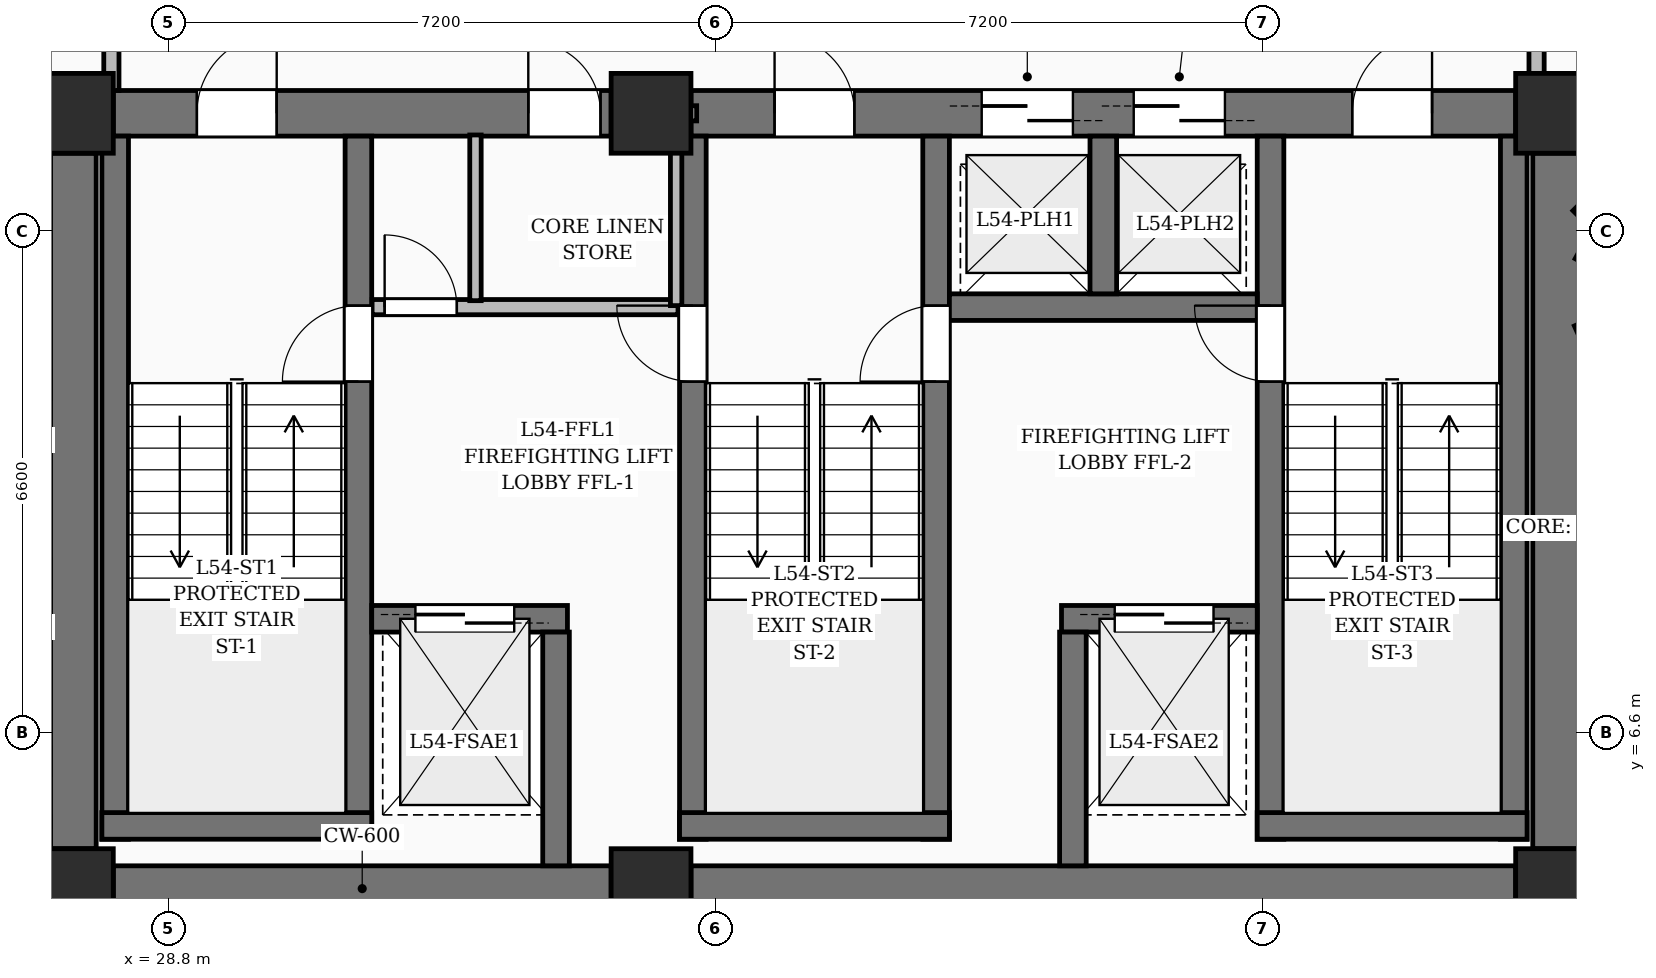
"""IFC4 building model, lengths in metres.
Left out: names, types, materials, properties, quantities, classifications, styles, units other than length and angle.
Written with IfcOpenShell. Run it as: python <this file> out.ifc"""

import sys

from ifc_helpers import new_model, si_unit, direction, frame, frame_2d, origin, origin_2d, place, context, subcontext, project, spatial, rectangle, extrude, element, fill, save


model = new_model("IFC4")
c1 = context("Model", 3, precision=1e-05, world=origin(), true_north=direction((0.0, 1.0)))
c2 = subcontext(c1, "Body", "Model", "MODEL_VIEW")
j1 = project(units=[si_unit("LENGTHUNIT", "METRE"), si_unit("PLANEANGLEUNIT", "RADIAN")], contexts=[c1])
p1 = place(None, origin())
s1 = spatial("IfcSite", under=j1, at=p1, CompositionType="ELEMENT")
p2 = place(p1, origin())
s2 = spatial("IfcBuilding", under=s1, at=p2, CompositionType="ELEMENT")
p3 = place(p2, frame((0.0, 0.0, 210.75)))
s3 = spatial("IfcBuildingStorey", under=s2, at=p3, CompositionType="ELEMENT", Elevation=210.75)
for number, where, z_axis, x_axis in (
    (1, (27.55, 4.55, 0.0), (0.0, 0.0, 1.0), (1.0, 0.0, 0.0)),
    (2, (35.15, 4.55, 0.0), (0.0, 0.0, 1.0), (1.0, 0.0, 0.0)),
    (3, (47.05, 4.55, 0.0), (0.0, 0.0, 1.0), (1.0, 0.0, 0.0)),
    (4, (27.55, 14.75, 0.0), (0.0, 0.0, 1.0), (1.0, 0.0, 0.0)),
    (5, (35.15, 14.75, 0.0), (0.0, 0.0, 1.0), (1.0, 0.0, 0.0)),
    (6, (47.05, 14.75, 0.0), (0.0, 0.0, 1.0), (1.0, 0.0, 0.0)),
):
    element("IfcColumn", number, at=place(p3, frame(where, z_axis=z_axis, x_axis=x_axis)), inside=s3, PredefinedType="COLUMN", context=c2, shape_type="SweptSolid", body=[
        extrude(rectangle(XDim=1.05, YDim=1.05, at=origin_2d()), origin(), (0.0, 0.0, 1.0), 3.75),
    ])
p4 = place(p3, frame((28.075, 4.55, 0.0), z_axis=(0.0, 0.0, 1.0), x_axis=(1.0, 0.0, 0.0)))
e7 = element("IfcWall", 7, at=p4, inside=s3, PredefinedType="SHEAR", context=c2, shape_type="SweptSolid", body=[
    extrude(rectangle(XDim=6.55, YDim=0.6, at=frame_2d((3.275, 0.0))), origin(), (0.0, 0.0, 1.0), 3.75),
])
p5 = place(p3, frame((35.675, 4.55, 0.0), z_axis=(0.0, 0.0, 1.0), x_axis=(1.0, 0.0, 0.0)))
e8 = element("IfcWall", 8, at=p5, inside=s3, PredefinedType="SHEAR", context=c2, shape_type="SweptSolid", body=[
    extrude(rectangle(XDim=10.85, YDim=0.6, at=frame_2d((5.425, 0.0))), origin(), (0.0, 0.0, 1.0), 3.75),
])
p6 = place(p3, frame((28.075, 14.75, 0.0), z_axis=(0.0, 0.0, 1.0), x_axis=(1.0, 0.0, 0.0)))
e9 = element("IfcWall", 9, at=p6, inside=s3, PredefinedType="SHEAR", context=c2, shape_type="SweptSolid", body=[
    extrude(rectangle(XDim=6.55, YDim=0.6, at=frame_2d((3.275, 0.0))), origin(), (0.0, 0.0, 1.0), 3.75),
])
p7 = place(p6, frame((1.1, 0.0, 0.0)))
e10 = element("IfcOpeningElement", 10, at=p7, cuts=e9, PredefinedType="OPENING", context=c2, shape_type="SweptSolid", body=[
    extrude(rectangle(XDim=1.05, YDim=2.15, at=frame_2d((0.525, 1.075))), frame((0.0, 0.31, 0.0), z_axis=(0.0, -1.0, 0.0), x_axis=(1.0, 0.0, 0.0)), (0.0, 0.0, 1.0), 0.62),
])
p8 = place(p6, frame((5.46, 0.0, 0.0)))
e11 = element("IfcOpeningElement", 11, at=p8, cuts=e9, PredefinedType="OPENING", context=c2, shape_type="SweptSolid", body=[
    extrude(rectangle(XDim=0.95, YDim=2.15, at=frame_2d((0.475, 1.075))), frame((0.0, 0.31, 0.0), z_axis=(0.0, -1.0, 0.0), x_axis=(1.0, 0.0, 0.0)), (0.0, 0.0, 1.0), 0.62),
])
p9 = place(p3, frame((35.675, 14.75, 0.0), z_axis=(0.0, 0.0, 1.0), x_axis=(1.0, 0.0, 0.0)))
e12 = element("IfcWall", 12, at=p9, inside=s3, PredefinedType="SHEAR", context=c2, shape_type="SweptSolid", body=[
    extrude(rectangle(XDim=10.85, YDim=0.6, at=frame_2d((5.425, 0.0))), origin(), (0.0, 0.0, 1.0), 3.75),
])
p10 = place(p9, frame((1.1, 0.0, 0.0)))
e13 = element("IfcOpeningElement", 13, at=p10, cuts=e12, PredefinedType="OPENING", context=c2, shape_type="SweptSolid", body=[
    extrude(rectangle(XDim=1.05, YDim=2.15, at=frame_2d((0.525, 1.075))), frame((0.0, 0.31, 0.0), z_axis=(0.0, -1.0, 0.0), x_axis=(1.0, 0.0, 0.0)), (0.0, 0.0, 1.0), 0.62),
])
p11 = place(p9, frame((8.7, 0.0, 0.0)))
e14 = element("IfcOpeningElement", 14, at=p11, cuts=e12, PredefinedType="OPENING", context=c2, shape_type="SweptSolid", body=[
    extrude(rectangle(XDim=1.05, YDim=2.15, at=frame_2d((0.525, 1.075))), frame((0.0, 0.31, 0.0), z_axis=(0.0, -1.0, 0.0), x_axis=(1.0, 0.0, 0.0)), (0.0, 0.0, 1.0), 0.62),
])
p12 = place(p9, frame((3.825, 0.0, 0.0)))
e15 = element("IfcOpeningElement", 15, at=p12, cuts=e12, PredefinedType="OPENING", context=c2, shape_type="SweptSolid", body=[
    extrude(rectangle(XDim=1.2, YDim=2.2, at=frame_2d((0.6, 1.1))), frame((0.0, 0.31, 0.0), z_axis=(0.0, -1.0, 0.0), x_axis=(1.0, 0.0, 0.0)), (0.0, 0.0, 1.0), 0.62),
])
p13 = place(p9, frame((5.825, 0.0, 0.0)))
e16 = element("IfcOpeningElement", 16, at=p13, cuts=e12, PredefinedType="OPENING", context=c2, shape_type="SweptSolid", body=[
    extrude(rectangle(XDim=1.2, YDim=2.2, at=frame_2d((0.6, 1.1))), frame((0.0, 0.31, 0.0), z_axis=(0.0, -1.0, 0.0), x_axis=(1.0, 0.0, 0.0)), (0.0, 0.0, 1.0), 0.62),
])
for number, where, z_axis, x_axis in (
    (17, (27.55, 5.075, 0.0), (0.0, 0.0, 1.0), (0.0, 1.0, 0.0)),
    (18, (47.05, 5.075, 0.0), (0.0, 0.0, 1.0), (0.0, 1.0, 0.0)),
):
    element("IfcWall", number, at=place(p3, frame(where, z_axis=z_axis, x_axis=x_axis)), inside=s3, PredefinedType="SHEAR", context=c2, shape_type="SweptSolid", body=[
        extrude(rectangle(XDim=9.15, YDim=0.6, at=frame_2d((4.575, 0.0))), origin(), (0.0, 0.0, 1.0), 3.75),
    ])
p14 = place(p3, frame((28.1, 5.2, 0.0), z_axis=(0.0, 0.0, 1.0), x_axis=(0.0, 1.0, 0.0)))
e19 = element("IfcWall", 19, at=p14, inside=s3, PredefinedType="SOLIDWALL", context=c2, shape_type="SweptSolid", body=[
    extrude(rectangle(XDim=9.25, YDim=0.35, at=frame_2d((4.625, 0.0))), origin(), (0.0, 0.0, 1.0), 3.75),
])
p15 = place(p3, frame((31.3, 5.2, 0.0), z_axis=(0.0, 0.0, 1.0), x_axis=(0.0, 1.0, 0.0)))
e20 = element("IfcWall", 20, at=p15, inside=s3, PredefinedType="SOLIDWALL", context=c2, shape_type="SweptSolid", body=[
    extrude(rectangle(XDim=9.25, YDim=0.35, at=frame_2d((4.625, 0.0))), origin(), (0.0, 0.0, 1.0), 3.75),
])
p16 = place(p15, frame((6.02, 0.0, 0.0)))
e21 = element("IfcOpeningElement", 21, at=p16, cuts=e20, PredefinedType="OPENING", context=c2, shape_type="SweptSolid", body=[
    extrude(rectangle(XDim=1.0, YDim=2.15, at=frame_2d((0.5, 1.075))), frame((0.0, 0.185, 0.0), z_axis=(0.0, -1.0, 0.0), x_axis=(1.0, 0.0, 0.0)), (0.0, 0.0, 1.0), 0.37),
])
p17 = place(p3, frame((27.925, 5.375, 0.0), z_axis=(0.0, 0.0, 1.0), x_axis=(1.0, 0.0, 0.0)))
e22 = element("IfcWall", 22, at=p17, inside=s3, PredefinedType="SOLIDWALL", context=c2, shape_type="SweptSolid", body=[
    extrude(rectangle(XDim=3.55, YDim=0.35, at=frame_2d((1.775, 0.0))), origin(), (0.0, 0.0, 1.0), 3.75),
])
p18 = place(p3, frame((35.7, 5.2, 0.0), z_axis=(0.0, 0.0, 1.0), x_axis=(0.0, 1.0, 0.0)))
e23 = element("IfcWall", 23, at=p18, inside=s3, PredefinedType="SOLIDWALL", context=c2, shape_type="SweptSolid", body=[
    extrude(rectangle(XDim=9.25, YDim=0.35, at=frame_2d((4.625, 0.0))), origin(), (0.0, 0.0, 1.0), 3.75),
])
p19 = place(p18, frame((6.02, 0.0, 0.0)))
e24 = element("IfcOpeningElement", 24, at=p19, cuts=e23, PredefinedType="OPENING", context=c2, shape_type="SweptSolid", body=[
    extrude(rectangle(XDim=1.0, YDim=2.15, at=frame_2d((0.5, 1.075))), frame((0.0, 0.185, 0.0), z_axis=(0.0, -1.0, 0.0), x_axis=(1.0, 0.0, 0.0)), (0.0, 0.0, 1.0), 0.37),
])
p20 = place(p3, frame((38.9, 5.2, 0.0), z_axis=(0.0, 0.0, 1.0), x_axis=(0.0, 1.0, 0.0)))
e25 = element("IfcWall", 25, at=p20, inside=s3, PredefinedType="SOLIDWALL", context=c2, shape_type="SweptSolid", body=[
    extrude(rectangle(XDim=9.25, YDim=0.35, at=frame_2d((4.625, 0.0))), origin(), (0.0, 0.0, 1.0), 3.75),
])
p21 = place(p20, frame((6.02, 0.0, 0.0)))
e26 = element("IfcOpeningElement", 26, at=p21, cuts=e25, PredefinedType="OPENING", context=c2, shape_type="SweptSolid", body=[
    extrude(rectangle(XDim=1.0, YDim=2.15, at=frame_2d((0.5, 1.075))), frame((0.0, 0.185, 0.0), z_axis=(0.0, -1.0, 0.0), x_axis=(1.0, 0.0, 0.0)), (0.0, 0.0, 1.0), 0.37),
])
p22 = place(p3, frame((35.525, 5.375, 0.0), z_axis=(0.0, 0.0, 1.0), x_axis=(1.0, 0.0, 0.0)))
e27 = element("IfcWall", 27, at=p22, inside=s3, PredefinedType="SOLIDWALL", context=c2, shape_type="SweptSolid", body=[
    extrude(rectangle(XDim=3.55, YDim=0.35, at=frame_2d((1.775, 0.0))), origin(), (0.0, 0.0, 1.0), 3.75),
])
p23 = place(p3, frame((43.3, 5.2, 0.0), z_axis=(0.0, 0.0, 1.0), x_axis=(0.0, 1.0, 0.0)))
e28 = element("IfcWall", 28, at=p23, inside=s3, PredefinedType="SOLIDWALL", context=c2, shape_type="SweptSolid", body=[
    extrude(rectangle(XDim=9.25, YDim=0.35, at=frame_2d((4.625, 0.0))), origin(), (0.0, 0.0, 1.0), 3.75),
])
p24 = place(p23, frame((6.02, 0.0, 0.0)))
e29 = element("IfcOpeningElement", 29, at=p24, cuts=e28, PredefinedType="OPENING", context=c2, shape_type="SweptSolid", body=[
    extrude(rectangle(XDim=1.0, YDim=2.15, at=frame_2d((0.5, 1.075))), frame((0.0, 0.185, 0.0), z_axis=(0.0, -1.0, 0.0), x_axis=(1.0, 0.0, 0.0)), (0.0, 0.0, 1.0), 0.37),
])
p25 = place(p3, frame((46.5, 5.2, 0.0), z_axis=(0.0, 0.0, 1.0), x_axis=(0.0, 1.0, 0.0)))
e30 = element("IfcWall", 30, at=p25, inside=s3, PredefinedType="SOLIDWALL", context=c2, shape_type="SweptSolid", body=[
    extrude(rectangle(XDim=9.25, YDim=0.35, at=frame_2d((4.625, 0.0))), origin(), (0.0, 0.0, 1.0), 3.75),
])
p26 = place(p3, frame((43.125, 5.375, 0.0), z_axis=(0.0, 0.0, 1.0), x_axis=(1.0, 0.0, 0.0)))
e31 = element("IfcWall", 31, at=p26, inside=s3, PredefinedType="SOLIDWALL", context=c2, shape_type="SweptSolid", body=[
    extrude(rectangle(XDim=3.55, YDim=0.35, at=frame_2d((1.775, 0.0))), origin(), (0.0, 0.0, 1.0), 3.75),
])
p27 = place(p3, frame((31.475, 8.1, 0.0), z_axis=(0.0, 0.0, 1.0), x_axis=(1.0, 0.0, 0.0)))
e32 = element("IfcWall", 32, at=p27, inside=s3, PredefinedType="SOLIDWALL", context=c2, shape_type="SweptSolid", body=[
    extrude(rectangle(XDim=2.575, YDim=0.35, at=frame_2d((1.288, 0.0))), origin(), (0.0, 0.0, 1.0), 3.75),
])
p28 = place(p27, frame((0.575, 0.0, 0.0)))
e33 = element("IfcOpeningElement", 33, at=p28, cuts=e32, PredefinedType="OPENING", context=c2, shape_type="SweptSolid", body=[
    extrude(rectangle(XDim=1.3, YDim=2.25, at=frame_2d((0.65, 1.125))), frame((0.0, 0.185, 0.0), z_axis=(0.0, -1.0, 0.0), x_axis=(1.0, 0.0, 0.0)), (0.0, 0.0, 1.0), 0.37),
])
p29 = place(p3, frame((40.55, 8.1, 0.0), z_axis=(0.0, 0.0, 1.0), x_axis=(1.0, 0.0, 0.0)))
e34 = element("IfcWall", 34, at=p29, inside=s3, PredefinedType="SOLIDWALL", context=c2, shape_type="SweptSolid", body=[
    extrude(rectangle(XDim=2.575, YDim=0.35, at=frame_2d((1.288, 0.0))), origin(), (0.0, 0.0, 1.0), 3.75),
])
p30 = place(p29, frame((0.7, 0.0, 0.0)))
e35 = element("IfcOpeningElement", 35, at=p30, cuts=e34, PredefinedType="OPENING", context=c2, shape_type="SweptSolid", body=[
    extrude(rectangle(XDim=1.3, YDim=2.25, at=frame_2d((0.65, 1.125))), frame((0.0, 0.185, 0.0), z_axis=(0.0, -1.0, 0.0), x_axis=(1.0, 0.0, 0.0)), (0.0, 0.0, 1.0), 0.37),
])
for number, where, z_axis, x_axis in (
    (36, (33.9, 4.85, 0.0), (0.0, 0.0, 1.0), (0.0, 1.0, 0.0)),
    (37, (40.7, 4.85, 0.0), (0.0, 0.0, 1.0), (0.0, 1.0, 0.0)),
):
    element("IfcWall", number, at=place(p3, frame(where, z_axis=z_axis, x_axis=x_axis)), inside=s3, PredefinedType="SOLIDWALL", context=c2, shape_type="SweptSolid", body=[
        extrude(rectangle(XDim=3.075, YDim=0.35, at=frame_2d((1.538, 0.0))), origin(), (0.0, 0.0, 1.0), 3.75),
    ])
p31 = place(p3, frame((39.075, 12.2, 0.0), z_axis=(0.0, 0.0, 1.0), x_axis=(1.0, 0.0, 0.0)))
e38 = element("IfcWall", 38, at=p31, inside=s3, PredefinedType="SOLIDWALL", context=c2, shape_type="SweptSolid", body=[
    extrude(rectangle(XDim=4.05, YDim=0.35, at=frame_2d((2.025, 0.0))), origin(), (0.0, 0.0, 1.0), 3.75),
])
p32 = place(p3, frame((41.1, 12.375, 0.0), z_axis=(0.0, 0.0, 1.0), x_axis=(0.0, 1.0, 0.0)))
e39 = element("IfcWall", 39, at=p32, inside=s3, PredefinedType="SOLIDWALL", context=c2, shape_type="SweptSolid", body=[
    extrude(rectangle(XDim=2.075, YDim=0.35, at=frame_2d((1.038, 0.0))), origin(), (0.0, 0.0, 1.0), 3.75),
])
p33 = place(p3, frame((34.72, 14.75, 0.0), z_axis=(0.0, 0.0, 1.0), x_axis=(1.0, 0.0, 0.0)))
e40 = element("IfcWall", 40, at=p33, inside=s3, PredefinedType="PARTITIONING", context=c2, shape_type="SweptSolid", body=[
    extrude(rectangle(XDim=1.03, YDim=0.2, at=frame_2d((0.515, 0.0))), origin(), (0.0, 0.0, 1.0), 2.685),
])
p34 = place(p3, frame((31.48, 12.2, 0.0), z_axis=(0.0, 0.0, 1.0), x_axis=(1.0, 0.0, 0.0)))
e41 = element("IfcWall", 41, at=p34, inside=s3, PredefinedType="PARTITIONING", context=c2, shape_type="SweptSolid", body=[
    extrude(rectangle(XDim=4.025, YDim=0.2, at=frame_2d((2.012, 0.0))), origin(), (0.0, 0.0, 1.0), 3.5),
])
p35 = place(p34, frame((0.165, 0.0, 0.0)))
e42 = element("IfcOpeningElement", 42, at=p35, cuts=e41, PredefinedType="OPENING", context=c2, shape_type="SweptSolid", body=[
    extrude(rectangle(XDim=0.95, YDim=2.15, at=frame_2d((0.475, 1.075))), frame((0.0, 0.11, 0.0), z_axis=(0.0, -1.0, 0.0), x_axis=(1.0, 0.0, 0.0)), (0.0, 0.0, 1.0), 0.22),
])
p36 = place(p3, frame((32.84, 12.285, 0.0), z_axis=(0.0, 0.0, 1.0), x_axis=(0.0, 1.0, 0.0)))
e43 = element("IfcWall", 43, at=p36, inside=s3, PredefinedType="PARTITIONING", context=c2, shape_type="SweptSolid", body=[
    extrude(rectangle(XDim=2.18, YDim=0.15, at=frame_2d((1.09, 0.0))), origin(), (0.0, 0.0, 1.0), 2.685),
])
p37 = place(p3, frame((35.48, 12.22, 0.0), z_axis=(0.0, 0.0, 1.0), x_axis=(0.0, 1.0, 0.0)))
e44 = element("IfcWall", 44, at=p37, inside=s3, PredefinedType="PARTITIONING", context=c2, shape_type="SweptSolid", body=[
    extrude(rectangle(XDim=2.396, YDim=0.15, at=frame_2d((1.198, 0.0))), origin(), (0.0, 0.0, 1.0), 3.5),
])
p38 = place(p3, frame((28.05, 16.75, 0.0), z_axis=(0.0, 0.0, 1.0), x_axis=(0.0, -1.0, 0.0)))
e45 = element("IfcWall", 45, at=p38, inside=s3, PredefinedType="PARTITIONING", context=c2, shape_type="SweptSolid", body=[
    extrude(rectangle(XDim=1.7, YDim=0.2, at=frame_2d((0.85, 0.0))), origin(), (0.0, 0.0, 1.0), 3.5),
])
p39 = place(p3, frame((46.8, 15.05, 0.0), z_axis=(0.0, 0.0, 1.0), x_axis=(0.0, 1.0, 0.0)))
e46 = element("IfcWall", 46, at=p39, inside=s3, PredefinedType="PARTITIONING", context=c2, shape_type="SweptSolid", body=[
    extrude(rectangle(XDim=1.7, YDim=0.2, at=frame_2d((0.85, 0.0))), origin(), (0.0, 0.0, 1.0), 2.685),
])
p40 = place(p3, frame((49.55, 7.19, 0.0), z_axis=(0.0, 0.0, 1.0), x_axis=(-0.410297221829, 0.91195185715, 0.0)))
e47 = element("IfcWall", 47, at=p40, inside=s3, PredefinedType="PARTITIONING", context=c2, shape_type="SweptSolid", body=[
    extrude(rectangle(XDim=5.267, YDim=0.2, at=frame_2d((2.634, 0.0))), origin(), (0.0, 0.0, 1.0), 2.685),
])
p41 = place(p3, frame((48.8, 12.09, 0.0), z_axis=(0.0, 0.0, 1.0), x_axis=(-0.707106781187, 0.707106781187, 0.0)))
e48 = element("IfcWall", 48, at=p41, inside=s3, PredefinedType="PARTITIONING", context=c2, shape_type="SweptSolid", body=[
    extrude(rectangle(XDim=2.051, YDim=0.2, at=frame_2d((1.025, 0.0))), origin(), (0.0, 0.0, 1.0), 3.5),
])
p42 = place(p3, frame((47.35, 12.914, 0.0), z_axis=(0.0, 0.0, 1.0), x_axis=(0.876281108122, -0.481800186331, 0.0)))
e49 = element("IfcWall", 49, at=p42, inside=s3, PredefinedType="PARTITIONING", context=c2, shape_type="SweptSolid", body=[
    extrude(rectangle(XDim=0.87, YDim=0.175, at=frame_2d((0.435, 0.0))), origin(), (0.0, 0.0, 1.0), 3.5),
])
p43 = place(p7, origin())
e50 = element("IfcDoor", 50, at=p43, inside=s3, OperationType="SINGLE_SWING_RIGHT", PredefinedType="DOOR", context=c2, shape_type="SweptSolid", body=[
    extrude(rectangle(XDim=1.05, YDim=2.15, at=frame_2d((0.525, 1.075))), frame((0.0, 0.025, 0.0), z_axis=(0.0, -1.0, 0.0), x_axis=(1.0, 0.0, 0.0)), (0.0, 0.0, 1.0), 0.05),
])
fill(e10, e50)
p44 = place(p10, origin())
e51 = element("IfcDoor", 51, at=p44, inside=s3, OperationType="SINGLE_SWING_LEFT", PredefinedType="DOOR", context=c2, shape_type="SweptSolid", body=[
    extrude(rectangle(XDim=1.05, YDim=2.15, at=frame_2d((0.525, 1.075))), frame((0.0, 0.025, 0.0), z_axis=(0.0, -1.0, 0.0), x_axis=(1.0, 0.0, 0.0)), (0.0, 0.0, 1.0), 0.05),
])
fill(e13, e51)
p45 = place(p11, origin())
e52 = element("IfcDoor", 52, at=p45, inside=s3, OperationType="SINGLE_SWING_RIGHT", PredefinedType="DOOR", context=c2, shape_type="SweptSolid", body=[
    extrude(rectangle(XDim=1.05, YDim=2.15, at=frame_2d((0.525, 1.075))), frame((0.0, 0.025, 0.0), z_axis=(0.0, -1.0, 0.0), x_axis=(1.0, 0.0, 0.0)), (0.0, 0.0, 1.0), 0.05),
])
fill(e14, e52)
p46 = place(p16, origin())
e53 = element("IfcDoor", 53, at=p46, inside=s3, OperationType="SINGLE_SWING_LEFT", PredefinedType="DOOR", context=c2, shape_type="SweptSolid", body=[
    extrude(rectangle(XDim=1.0, YDim=2.15, at=frame_2d((0.5, 1.075))), frame((0.0, 0.025, 0.0), z_axis=(0.0, -1.0, 0.0), x_axis=(1.0, 0.0, 0.0)), (0.0, 0.0, 1.0), 0.05),
])
fill(e21, e53)
p47 = place(p19, origin())
e54 = element("IfcDoor", 54, at=p47, inside=s3, OperationType="SINGLE_SWING_RIGHT", PredefinedType="DOOR", context=c2, shape_type="SweptSolid", body=[
    extrude(rectangle(XDim=1.0, YDim=2.15, at=frame_2d((0.5, 1.075))), frame((0.0, 0.025, 0.0), z_axis=(0.0, -1.0, 0.0), x_axis=(1.0, 0.0, 0.0)), (0.0, 0.0, 1.0), 0.05),
])
fill(e24, e54)
p48 = place(p21, origin())
e55 = element("IfcDoor", 55, at=p48, inside=s3, OperationType="SINGLE_SWING_LEFT", PredefinedType="DOOR", context=c2, shape_type="SweptSolid", body=[
    extrude(rectangle(XDim=1.0, YDim=2.15, at=frame_2d((0.5, 1.075))), frame((0.0, 0.025, 0.0), z_axis=(0.0, -1.0, 0.0), x_axis=(1.0, 0.0, 0.0)), (0.0, 0.0, 1.0), 0.05),
])
fill(e26, e55)
p49 = place(p24, origin())
e56 = element("IfcDoor", 56, at=p49, inside=s3, OperationType="SINGLE_SWING_RIGHT", PredefinedType="DOOR", context=c2, shape_type="SweptSolid", body=[
    extrude(rectangle(XDim=1.0, YDim=2.15, at=frame_2d((0.5, 1.075))), frame((0.0, 0.025, 0.0), z_axis=(0.0, -1.0, 0.0), x_axis=(1.0, 0.0, 0.0)), (0.0, 0.0, 1.0), 0.05),
])
fill(e29, e56)
p50 = place(p28, origin())
e57 = element("IfcDoor", 57, at=p50, inside=s3, OperationType="DOUBLE_DOOR_SLIDING", PredefinedType="DOOR", context=c2, shape_type="SweptSolid", body=[
    extrude(rectangle(XDim=1.3, YDim=2.25, at=frame_2d((0.65, 1.125))), frame((0.0, 0.025, 0.0), z_axis=(0.0, -1.0, 0.0), x_axis=(1.0, 0.0, 0.0)), (0.0, 0.0, 1.0), 0.05),
])
fill(e33, e57)
p51 = place(p30, origin())
e58 = element("IfcDoor", 58, at=p51, inside=s3, OperationType="DOUBLE_DOOR_SLIDING", PredefinedType="DOOR", context=c2, shape_type="SweptSolid", body=[
    extrude(rectangle(XDim=1.3, YDim=2.25, at=frame_2d((0.65, 1.125))), frame((0.0, 0.025, 0.0), z_axis=(0.0, -1.0, 0.0), x_axis=(1.0, 0.0, 0.0)), (0.0, 0.0, 1.0), 0.05),
])
fill(e35, e58)
p52 = place(p12, origin())
e59 = element("IfcDoor", 59, at=p52, inside=s3, OperationType="DOUBLE_DOOR_SLIDING", PredefinedType="DOOR", context=c2, shape_type="SweptSolid", body=[
    extrude(rectangle(XDim=1.2, YDim=2.2, at=frame_2d((0.6, 1.1))), frame((0.0, 0.025, 0.0), z_axis=(0.0, -1.0, 0.0), x_axis=(1.0, 0.0, 0.0)), (0.0, 0.0, 1.0), 0.05),
])
fill(e15, e59)
p53 = place(p13, origin())
e60 = element("IfcDoor", 60, at=p53, inside=s3, OperationType="DOUBLE_DOOR_SLIDING", PredefinedType="DOOR", context=c2, shape_type="SweptSolid", body=[
    extrude(rectangle(XDim=1.2, YDim=2.2, at=frame_2d((0.6, 1.1))), frame((0.0, 0.025, 0.0), z_axis=(0.0, -1.0, 0.0), x_axis=(1.0, 0.0, 0.0)), (0.0, 0.0, 1.0), 0.05),
])
fill(e16, e60)
p54 = place(p35, origin())
e61 = element("IfcDoor", 61, at=p54, inside=s3, OperationType="SINGLE_SWING_LEFT", PredefinedType="DOOR", context=c2, shape_type="SweptSolid", body=[
    extrude(rectangle(XDim=0.95, YDim=2.15, at=frame_2d((0.475, 1.075))), frame((0.0, 0.025, 0.0), z_axis=(0.0, -1.0, 0.0), x_axis=(1.0, 0.0, 0.0)), (0.0, 0.0, 1.0), 0.05),
])
fill(e42, e61)
p55 = place(p8, origin())
e62 = element("IfcDoor", 62, at=p55, inside=s3, OperationType="SINGLE_SWING_LEFT", PredefinedType="DOOR", context=c2, shape_type="SweptSolid", body=[
    extrude(rectangle(XDim=0.95, YDim=2.15, at=frame_2d((0.475, 1.075))), frame((0.0, 0.025, 0.0), z_axis=(0.0, -1.0, 0.0), x_axis=(1.0, 0.0, 0.0)), (0.0, 0.0, 1.0), 0.05),
])
fill(e11, e62)
save(model, sys.argv[1])
